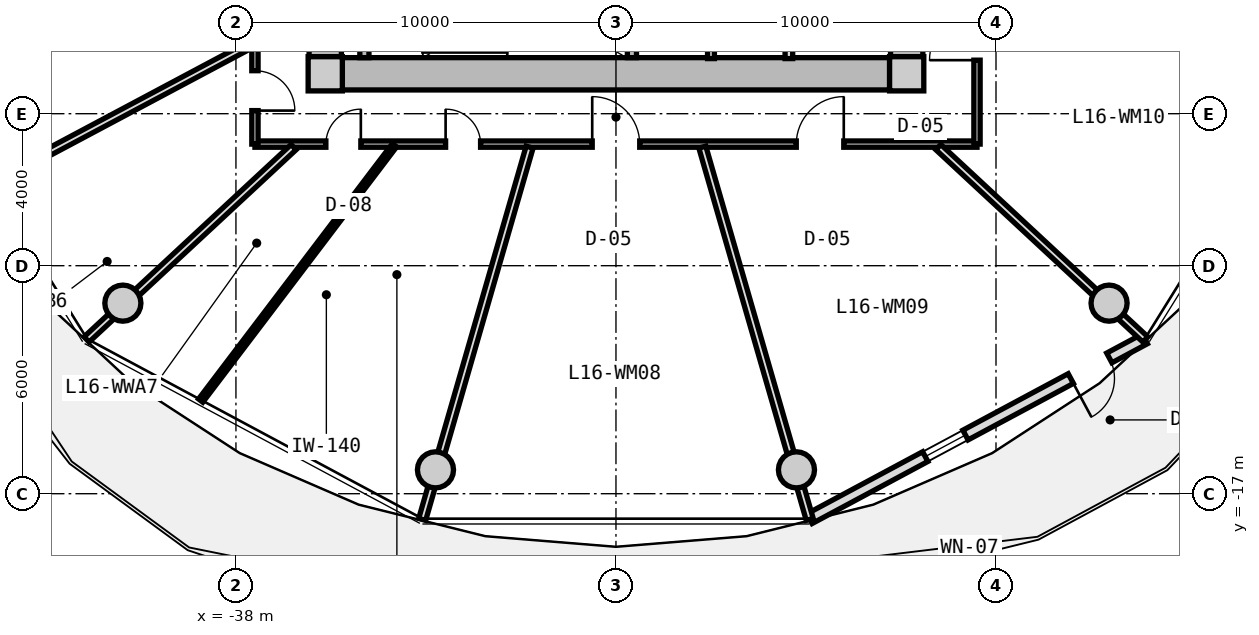
"""IFC4 building model, lengths in metres.
Left out: names, types, materials, properties, quantities, classifications, styles, units other than length and angle.
Written with IfcOpenShell. Run it as: python <this file> out.ifc"""

import sys

from ifc_helpers import new_model, si_unit, direction, frame, frame_2d, origin, origin_2d, place, context, subcontext, project, spatial, rectangle, circle, extrude, source, transform, mapped, element, fill, save


model = new_model("IFC4")
c1 = context("Model", 3, precision=1e-05, world=origin(), true_north=direction((0.0, 1.0)))
c2 = subcontext(c1, "Body", "Model", "MODEL_VIEW")
j1 = project(units=[si_unit("LENGTHUNIT", "METRE"), si_unit("PLANEANGLEUNIT", "RADIAN")], contexts=[c1])
p1 = place(None, origin())
s1 = spatial("IfcSite", under=j1, at=p1, CompositionType="ELEMENT")
p2 = place(p1, origin())
s2 = spatial("IfcBuilding", under=s1, at=p2, CompositionType="ELEMENT")
p3 = place(p2, frame((0.0, 0.0, 55.15)))
s3 = spatial("IfcBuildingStorey", under=s2, at=p3, CompositionType="ELEMENT", Elevation=55.15)
m1 = source(origin(), c2, "Body", "SweptSolid", [
    extrude(rectangle(XDim=0.9, YDim=0.9, at=origin_2d()), origin(), (0.0, 0.0, 1.0), 3.05),
])
for number, where, z_axis, x_axis in (
    (1, (-35.65, -5.95, 0.0), (0.0, 0.0, 1.0), (1.0, 0.0, 0.0)),
    (2, (-20.35, -5.95, 0.0), (0.0, 0.0, 1.0), (1.0, 0.0, 0.0)),
):
    element("IfcColumn", number, at=place(p3, frame(where, z_axis=z_axis, x_axis=x_axis)), inside=s3, PredefinedType="COLUMN", context=c2, shape_type="MappedRepresentation", body=[
        mapped(m1, transform((0.0, 0.0, 0.0), x_axis=(1.0, 0.0, 0.0), y_axis=(0.0, 1.0, 0.0), z_axis=(0.0, 0.0, 1.0), scale=1.0)),
    ])
m2 = source(origin(), c2, "Body", "SweptSolid", [
    extrude(rectangle(XDim=14.4, YDim=0.85, at=frame_2d((7.2, 0.0))), origin(), (0.0, 0.0, 1.0), 2.79),
])
p4 = place(p3, frame((-20.8, -5.95, 0.0), z_axis=(0.0, 0.0, 1.0), x_axis=(-1.0, 0.0, 0.0)))
e3 = element("IfcWall", 3, at=p4, inside=s3, PredefinedType="SHEAR", context=c2, shape_type="MappedRepresentation", body=[
    mapped(m2, transform((0.0, 0.0, 0.0), x_axis=(1.0, 0.0, 0.0), y_axis=(0.0, 1.0, 0.0), z_axis=(0.0, 0.0, 1.0), scale=1.0)),
])
m3 = source(origin(), c2, "Body", "SweptSolid", [
    extrude(rectangle(XDim=11.0, YDim=0.85, at=frame_2d((5.5, 0.0))), origin(), (0.0, 0.0, 1.0), 2.79),
])
p5 = place(p3, frame((-35.65, -5.5, 0.0), z_axis=(0.0, 0.0, 1.0), x_axis=(0.0, 1.0, 0.0)))
e4 = element("IfcWall", 4, at=p5, inside=s3, PredefinedType="SHEAR", context=c2, shape_type="MappedRepresentation", body=[
    mapped(m3, transform((0.0, 0.0, 0.0), x_axis=(1.0, 0.0, 0.0), y_axis=(0.0, 1.0, 0.0), z_axis=(0.0, 0.0, 1.0), scale=1.0)),
])
p6 = place(p5, frame((3.8, 0.0, 0.0)))
e5 = element("IfcOpeningElement", 5, at=p6, cuts=e4, PredefinedType="OPENING", context=c2, shape_type="SweptSolid", body=[
    extrude(rectangle(XDim=1.2, YDim=2.15, at=frame_2d((0.6, 1.075))), frame((0.0, 0.435, 0.0), z_axis=(0.0, -1.0, 0.0), x_axis=(1.0, 0.0, 0.0)), (0.0, 0.0, 1.0), 0.87),
])
p7 = place(p3, frame((-20.35, 5.5, 0.0), z_axis=(0.0, 0.0, 1.0), x_axis=(0.0, -1.0, 0.0)))
e6 = element("IfcWall", 6, at=p7, inside=s3, PredefinedType="SHEAR", context=c2, shape_type="MappedRepresentation", body=[
    mapped(m3, transform((0.0, 0.0, 0.0), x_axis=(1.0, 0.0, 0.0), y_axis=(0.0, 1.0, 0.0), z_axis=(0.0, 0.0, 1.0), scale=1.0)),
])
p8 = place(p7, frame((5.65, 0.0, 0.0)))
e7 = element("IfcOpeningElement", 7, at=p8, cuts=e6, PredefinedType="OPENING", context=c2, shape_type="SweptSolid", body=[
    extrude(rectangle(XDim=1.2, YDim=2.15, at=frame_2d((0.6, 1.075))), frame((0.0, 0.435, 0.0), z_axis=(0.0, -1.0, 0.0), x_axis=(1.0, 0.0, 0.0)), (0.0, 0.0, 1.0), 0.87),
])
p9 = place(p7, frame((9.3, 0.0, 0.0)))
e8 = element("IfcOpeningElement", 8, at=p9, cuts=e6, PredefinedType="OPENING", context=c2, shape_type="SweptSolid", body=[
    extrude(rectangle(XDim=1.0, YDim=2.1, at=frame_2d((0.5, 1.05))), frame((0.0, 0.435, 0.0), z_axis=(0.0, -1.0, 0.0), x_axis=(1.0, 0.0, 0.0)), (0.0, 0.0, 1.0), 0.87),
])
m4 = source(origin(), c2, "Body", "SweptSolid", [
    extrude(circle(Radius=0.475, at=origin_2d()), origin(), (0.0, 0.0, 1.0), 3.05),
])
for number, where, z_axis, x_axis in (
    (9, (-40.975, -11.985, 0.0), (0.0, 0.0, 1.0), (1.0, 0.0, 0.0)),
    (10, (-32.749, -16.373, 0.0), (0.0, 0.0, 1.0), (1.0, 0.0, 0.0)),
    (11, (-23.251, -16.373, 0.0), (0.0, 0.0, 1.0), (1.0, 0.0, 0.0)),
    (12, (-15.025, -11.985, 0.0), (0.0, 0.0, 1.0), (1.0, 0.0, 0.0)),
):
    element("IfcColumn", number, at=place(p3, frame(where, z_axis=z_axis, x_axis=x_axis)), inside=s3, PredefinedType="COLUMN", context=c2, shape_type="MappedRepresentation", body=[
        mapped(m4, transform((0.0, 0.0, 0.0), x_axis=(1.0, 0.0, 0.0), y_axis=(0.0, 1.0, 0.0), z_axis=(0.0, 0.0, 1.0), scale=1.0)),
    ])
m5 = source(origin(), c2, "Body", "SweptSolid", [
    extrude(rectangle(XDim=10.011, YDim=0.29, at=frame_2d((5.005, 0.0))), origin(), (0.0, 0.0, 1.0), 2.79),
])
p10 = place(p3, frame((-14.084, -12.926, 0.0), z_axis=(0.0, 0.0, 1.0), x_axis=(-0.881272505317, -0.472608475773, 0.0)))
e13 = element("IfcWall", 13, at=p10, inside=s3, PredefinedType="SOLIDWALL", context=c2, shape_type="MappedRepresentation", body=[
    mapped(m5, transform((0.0, 0.0, 0.0), x_axis=(1.0, 0.0, 0.0), y_axis=(0.0, 1.0, 0.0), z_axis=(0.0, 0.0, 1.0), scale=1.0)),
])
p11 = place(p10, frame((1.06, 0.0, 0.0)))
e14 = element("IfcOpeningElement", 14, at=p11, cuts=e13, PredefinedType="OPENING", context=c2, shape_type="SweptSolid", body=[
    extrude(rectangle(XDim=1.15, YDim=2.25, at=frame_2d((0.575, 1.125))), frame((0.0, 0.155, 0.0), z_axis=(0.0, -1.0, 0.0), x_axis=(1.0, 0.0, 0.0)), (0.0, 0.0, 1.0), 0.31),
])
p12 = place(p10, frame((5.355, 0.0, 0.85)))
e15 = element("IfcOpeningElement", 15, at=p12, cuts=e13, PredefinedType="OPENING", context=c2, shape_type="SweptSolid", body=[
    extrude(rectangle(XDim=1.2, YDim=1.5, at=frame_2d((0.6, 0.75))), frame((0.0, 0.155, 0.0), z_axis=(0.0, -1.0, 0.0), x_axis=(1.0, 0.0, 0.0)), (0.0, 0.0, 1.0), 0.31),
])
m6 = source(origin(), c2, "Body", "SweptSolid", [
    extrude(rectangle(XDim=3.075, YDim=0.24, at=frame_2d((1.538, 0.0))), origin(), (0.0, 0.0, 1.0), 2.79),
])
for number, where, z_axis, x_axis in (
    (16, (-34.62, -5.525, 0.0), (0.0, 0.0, 1.0), (0.0, 1.0, 0.0)),
    (17, (-27.58, -5.525, 0.0), (0.0, 0.0, 1.0), (0.0, 1.0, 0.0)),
):
    element("IfcWall", number, at=place(p3, frame(where, z_axis=z_axis, x_axis=x_axis)), inside=s3, PredefinedType="PARTITIONING", context=c2, shape_type="MappedRepresentation", body=[
        mapped(m6, transform((0.0, 0.0, 0.0), x_axis=(1.0, 0.0, 0.0), y_axis=(0.0, 1.0, 0.0), z_axis=(0.0, 0.0, 1.0), scale=1.0)),
    ])
m7 = source(origin(), c2, "Body", "SweptSolid", [
    extrude(rectangle(XDim=3.8, YDim=0.2, at=frame_2d((1.9, 0.0))), origin(), (0.0, 0.0, 1.0), 2.775),
])
p13 = place(p3, frame((-23.45, -5.55, 0.0), z_axis=(0.0, 0.0, 1.0), x_axis=(0.0, 1.0, 0.0)))
e18 = element("IfcWall", 18, at=p13, inside=s3, PredefinedType="PARTITIONING", context=c2, shape_type="MappedRepresentation", body=[
    mapped(m7, transform((0.0, 0.0, 0.0), x_axis=(1.0, 0.0, 0.0), y_axis=(0.0, 1.0, 0.0), z_axis=(0.0, 0.0, 1.0), scale=1.0)),
])
m8 = source(origin(), c2, "Body", "SweptSolid", [
    extrude(rectangle(XDim=3.22, YDim=0.18, at=frame_2d((1.61, 0.0))), origin(), (0.0, 0.0, 1.0), 2.775),
])
p14 = place(p3, frame((-25.5, -5.55, 0.0), z_axis=(0.0, 0.0, 1.0), x_axis=(0.0, 1.0, 0.0)))
e19 = element("IfcWall", 19, at=p14, inside=s3, PredefinedType="PARTITIONING", context=c2, shape_type="MappedRepresentation", body=[
    mapped(m8, transform((0.0, 0.0, 0.0), x_axis=(1.0, 0.0, 0.0), y_axis=(0.0, 1.0, 0.0), z_axis=(0.0, 0.0, 1.0), scale=1.0)),
])
m9 = source(origin(), c2, "Body", "SweptSolid", [
    extrude(rectangle(XDim=19.0, YDim=0.165, at=frame_2d((9.5, 0.0))), origin(), (0.0, 0.0, 1.0), 2.775),
])
p15 = place(p3, frame((-18.5, -7.8, 0.0), z_axis=(0.0, 0.0, 1.0), x_axis=(-1.0, 0.0, 0.0)))
e20 = element("IfcWall", 20, at=p15, inside=s3, PredefinedType="PARTITIONING", context=c2, shape_type="MappedRepresentation", body=[
    mapped(m9, transform((0.0, 0.0, 0.0), x_axis=(1.0, 0.0, 0.0), y_axis=(0.0, 1.0, 0.0), z_axis=(0.0, 0.0, 1.0), scale=1.0)),
])
p16 = place(p15, frame((16.214, 0.0, 0.0)))
e21 = element("IfcOpeningElement", 21, at=p16, cuts=e20, PredefinedType="OPENING", context=c2, shape_type="SweptSolid", body=[
    extrude(rectangle(XDim=0.92, YDim=2.1, at=frame_2d((0.46, 1.05))), frame((0.0, 0.093, 0.0), z_axis=(0.0, -1.0, 0.0), x_axis=(1.0, 0.0, 0.0)), (0.0, 0.0, 1.0), 0.185),
])
p17 = place(p15, frame((13.063, 0.0, 0.0)))
e22 = element("IfcOpeningElement", 22, at=p17, cuts=e20, PredefinedType="OPENING", context=c2, shape_type="SweptSolid", body=[
    extrude(rectangle(XDim=0.92, YDim=2.1, at=frame_2d((0.46, 1.05))), frame((0.0, 0.093, 0.0), z_axis=(0.0, -1.0, 0.0), x_axis=(1.0, 0.0, 0.0)), (0.0, 0.0, 1.0), 0.185),
])
p18 = place(p15, frame((8.875, 0.0, 0.0)))
e23 = element("IfcOpeningElement", 23, at=p18, cuts=e20, PredefinedType="OPENING", context=c2, shape_type="SweptSolid", body=[
    extrude(rectangle(XDim=1.25, YDim=2.2, at=frame_2d((0.625, 1.1))), frame((0.0, 0.093, 0.0), z_axis=(0.0, -1.0, 0.0), x_axis=(1.0, 0.0, 0.0)), (0.0, 0.0, 1.0), 0.185),
])
p19 = place(p15, frame((3.506, 0.0, 0.0)))
e24 = element("IfcOpeningElement", 24, at=p19, cuts=e20, PredefinedType="OPENING", context=c2, shape_type="SweptSolid", body=[
    extrude(rectangle(XDim=1.25, YDim=2.2, at=frame_2d((0.625, 1.1))), frame((0.0, 0.093, 0.0), z_axis=(0.0, -1.0, 0.0), x_axis=(1.0, 0.0, 0.0)), (0.0, 0.0, 1.0), 0.185),
])
m10 = source(origin(), c2, "Body", "SweptSolid", [
    extrude(rectangle(XDim=15.6, YDim=0.165, at=frame_2d((7.8, 0.0))), origin(), (0.0, 0.0, 1.0), 2.775),
])
p20 = place(p3, frame((-37.5, -7.8, 0.0), z_axis=(0.0, 0.0, 1.0), x_axis=(0.0, 1.0, 0.0)))
e25 = element("IfcWall", 25, at=p20, inside=s3, PredefinedType="PARTITIONING", context=c2, shape_type="MappedRepresentation", body=[
    mapped(m10, transform((0.0, 0.0, 0.0), x_axis=(1.0, 0.0, 0.0), y_axis=(0.0, 1.0, 0.0), z_axis=(0.0, 0.0, 1.0), scale=1.0)),
])
p21 = place(p20, frame((13.623, 0.0, 0.0)))
e26 = element("IfcOpeningElement", 26, at=p21, cuts=e25, PredefinedType="OPENING", context=c2, shape_type="SweptSolid", body=[
    extrude(rectangle(XDim=1.05, YDim=2.15, at=frame_2d((0.525, 1.075))), frame((0.0, 0.093, 0.0), z_axis=(0.0, -1.0, 0.0), x_axis=(1.0, 0.0, 0.0)), (0.0, 0.0, 1.0), 0.185),
])
p22 = place(p20, frame((11.018, 0.0, 0.0)))
e27 = element("IfcOpeningElement", 27, at=p22, cuts=e25, PredefinedType="OPENING", context=c2, shape_type="SweptSolid", body=[
    extrude(rectangle(XDim=1.05, YDim=2.15, at=frame_2d((0.525, 1.075))), frame((0.0, 0.093, 0.0), z_axis=(0.0, -1.0, 0.0), x_axis=(1.0, 0.0, 0.0)), (0.0, 0.0, 1.0), 0.185),
])
p23 = place(p20, frame((8.467, 0.0, 0.0)))
e28 = element("IfcOpeningElement", 28, at=p23, cuts=e25, PredefinedType="OPENING", context=c2, shape_type="SweptSolid", body=[
    extrude(rectangle(XDim=1.05, YDim=2.15, at=frame_2d((0.525, 1.075))), frame((0.0, 0.093, 0.0), z_axis=(0.0, -1.0, 0.0), x_axis=(1.0, 0.0, 0.0)), (0.0, 0.0, 1.0), 0.185),
])
p24 = place(p20, frame((6.035, 0.0, 0.0)))
e29 = element("IfcOpeningElement", 29, at=p24, cuts=e25, PredefinedType="OPENING", context=c2, shape_type="SweptSolid", body=[
    extrude(rectangle(XDim=1.05, YDim=2.15, at=frame_2d((0.525, 1.075))), frame((0.0, 0.093, 0.0), z_axis=(0.0, -1.0, 0.0), x_axis=(1.0, 0.0, 0.0)), (0.0, 0.0, 1.0), 0.185),
])
p25 = place(p20, frame((3.489, 0.0, 0.0)))
e30 = element("IfcOpeningElement", 30, at=p25, cuts=e25, PredefinedType="OPENING", context=c2, shape_type="SweptSolid", body=[
    extrude(rectangle(XDim=1.05, YDim=2.15, at=frame_2d((0.525, 1.075))), frame((0.0, 0.093, 0.0), z_axis=(0.0, -1.0, 0.0), x_axis=(1.0, 0.0, 0.0)), (0.0, 0.0, 1.0), 0.185),
])
p26 = place(p20, frame((0.882, 0.0, 0.0)))
e31 = element("IfcOpeningElement", 31, at=p26, cuts=e25, PredefinedType="OPENING", context=c2, shape_type="SweptSolid", body=[
    extrude(rectangle(XDim=1.05, YDim=2.15, at=frame_2d((0.525, 1.075))), frame((0.0, 0.093, 0.0), z_axis=(0.0, -1.0, 0.0), x_axis=(1.0, 0.0, 0.0)), (0.0, 0.0, 1.0), 0.185),
])
p27 = place(p3, frame((-18.5, 7.8, 0.0), z_axis=(0.0, 0.0, 1.0), x_axis=(0.0, -1.0, 0.0)))
e32 = element("IfcWall", 32, at=p27, inside=s3, PredefinedType="PARTITIONING", context=c2, shape_type="MappedRepresentation", body=[
    mapped(m10, transform((0.0, 0.0, 0.0), x_axis=(1.0, 0.0, 0.0), y_axis=(0.0, 1.0, 0.0), z_axis=(0.0, 0.0, 1.0), scale=1.0)),
])
p28 = place(p27, frame((12.141, 0.0, 0.0)))
e33 = element("IfcOpeningElement", 33, at=p28, cuts=e32, PredefinedType="OPENING", context=c2, shape_type="SweptSolid", body=[
    extrude(rectangle(XDim=1.25, YDim=2.2, at=frame_2d((0.625, 1.1))), frame((0.0, 0.093, 0.0), z_axis=(0.0, -1.0, 0.0), x_axis=(1.0, 0.0, 0.0)), (0.0, 0.0, 1.0), 0.185),
])
p29 = place(p27, frame((7.175, 0.0, 0.0)))
e34 = element("IfcOpeningElement", 34, at=p29, cuts=e32, PredefinedType="OPENING", context=c2, shape_type="SweptSolid", body=[
    extrude(rectangle(XDim=1.25, YDim=2.2, at=frame_2d((0.625, 1.1))), frame((0.0, 0.093, 0.0), z_axis=(0.0, -1.0, 0.0), x_axis=(1.0, 0.0, 0.0)), (0.0, 0.0, 1.0), 0.185),
])
p30 = place(p27, frame((2.826, 0.0, 0.0)))
e35 = element("IfcOpeningElement", 35, at=p30, cuts=e32, PredefinedType="OPENING", context=c2, shape_type="SweptSolid", body=[
    extrude(rectangle(XDim=1.05, YDim=2.15, at=frame_2d((0.525, 1.075))), frame((0.0, 0.093, 0.0), z_axis=(0.0, -1.0, 0.0), x_axis=(1.0, 0.0, 0.0)), (0.0, 0.0, 1.0), 0.185),
])
p31 = place(p27, frame((0.881, 0.0, 0.0)))
e36 = element("IfcOpeningElement", 36, at=p31, cuts=e32, PredefinedType="OPENING", context=c2, shape_type="SweptSolid", body=[
    extrude(rectangle(XDim=1.05, YDim=2.15, at=frame_2d((0.525, 1.075))), frame((0.0, 0.093, 0.0), z_axis=(0.0, -1.0, 0.0), x_axis=(1.0, 0.0, 0.0)), (0.0, 0.0, 1.0), 0.185),
])
m11 = source(origin(), c2, "Body", "SweptSolid", [
    extrude(rectangle(XDim=7.435, YDim=0.19, at=frame_2d((3.717, 0.0))), origin(), (0.0, 0.0, 1.0), 2.225),
])
p32 = place(p3, frame((-36.483, -7.88, 0.0), z_axis=(0.0, 0.0, 1.0), x_axis=(-0.732651956848, -0.680603489652, 0.0)))
e37 = element("IfcWall", 37, at=p32, inside=s3, PredefinedType="PARTITIONING", context=c2, shape_type="MappedRepresentation", body=[
    mapped(m11, transform((0.0, 0.0, 0.0), x_axis=(1.0, 0.0, 0.0), y_axis=(0.0, 1.0, 0.0), z_axis=(0.0, 0.0, 1.0), scale=1.0)),
])
m12 = source(origin(), c2, "Body", "SweptSolid", [
    extrude(rectangle(XDim=7.873, YDim=0.19, at=frame_2d((3.937, 0.0))), origin(), (0.0, 0.0, 1.0), 2.775),
])
p33 = place(p3, frame((-37.53, -5.138, 0.0), z_axis=(0.0, 0.0, 1.0), x_axis=(-0.882666052726, -0.470000680175, 0.0)))
e38 = element("IfcWall", 38, at=p33, inside=s3, PredefinedType="PARTITIONING", context=c2, shape_type="MappedRepresentation", body=[
    mapped(m12, transform((0.0, 0.0, 0.0), x_axis=(1.0, 0.0, 0.0), y_axis=(0.0, 1.0, 0.0), z_axis=(0.0, 0.0, 1.0), scale=1.0)),
])
m13 = source(origin(), c2, "Body", "SweptSolid", [
    extrude(rectangle(XDim=10.196, YDim=0.19, at=frame_2d((5.098, 0.0))), origin(), (0.0, 0.0, 1.0), 2.225),
])
p34 = place(p3, frame((-30.273, -7.88, 0.0), z_axis=(0.0, 0.0, 1.0), x_axis=(-0.277136420347, -0.960830580549, 0.0)))
e39 = element("IfcWall", 39, at=p34, inside=s3, PredefinedType="PARTITIONING", context=c2, shape_type="MappedRepresentation", body=[
    mapped(m13, transform((0.0, 0.0, 0.0), x_axis=(1.0, 0.0, 0.0), y_axis=(0.0, 1.0, 0.0), z_axis=(0.0, 0.0, 1.0), scale=1.0)),
])
m14 = source(origin(), c2, "Body", "SweptSolid", [
    extrude(rectangle(XDim=8.436, YDim=0.14, at=frame_2d((4.218, 0.0))), origin(), (0.0, 0.0, 1.0), 2.775),
])
p35 = place(p3, frame((-33.828, -7.83, 0.0), z_axis=(0.0, 0.0, 1.0), x_axis=(-0.604486552388, -0.796615345058, 0.0)))
e40 = element("IfcWall", 40, at=p35, inside=s3, PredefinedType="PARTITIONING", context=c2, shape_type="MappedRepresentation", body=[
    mapped(m14, transform((0.0, 0.0, 0.0), x_axis=(1.0, 0.0, 0.0), y_axis=(0.0, 1.0, 0.0), z_axis=(0.0, 0.0, 1.0), scale=1.0)),
])
m15 = source(origin(), c2, "Body", "SweptSolid", [
    extrude(rectangle(XDim=10.196, YDim=0.19, at=frame_2d((5.098, 0.0))), origin(), (0.0, 0.0, 1.0), 2.415),
])
p36 = place(p3, frame((-25.727, -7.88, 0.0), z_axis=(0.0, 0.0, 1.0), x_axis=(0.277136420347, -0.960830580549, 0.0)))
e41 = element("IfcWall", 41, at=p36, inside=s3, PredefinedType="PARTITIONING", context=c2, shape_type="MappedRepresentation", body=[
    mapped(m15, transform((0.0, 0.0, 0.0), x_axis=(1.0, 0.0, 0.0), y_axis=(0.0, 1.0, 0.0), z_axis=(0.0, 0.0, 1.0), scale=1.0)),
])
p37 = place(p3, frame((-19.517, -7.88, 0.0), z_axis=(0.0, 0.0, 1.0), x_axis=(0.732651956848, -0.680603489652, 0.0)))
e42 = element("IfcWall", 42, at=p37, inside=s3, PredefinedType="PARTITIONING", context=c2, shape_type="MappedRepresentation", body=[
    mapped(m11, transform((0.0, 0.0, 0.0), x_axis=(1.0, 0.0, 0.0), y_axis=(0.0, 1.0, 0.0), z_axis=(0.0, 0.0, 1.0), scale=1.0)),
])
m16 = source(origin(), c2, "Body", "SweptSolid", [
    extrude(rectangle(XDim=1.15, YDim=2.25, at=frame_2d((0.575, 1.125))), frame((0.0, 0.025, 0.0), z_axis=(0.0, -1.0, 0.0), x_axis=(1.0, 0.0, 0.0)), (0.0, 0.0, 1.0), 0.05),
])
p38 = place(p11, origin())
e43 = element("IfcDoor", 43, at=p38, inside=s3, OperationType="SINGLE_SWING_RIGHT", PredefinedType="DOOR", context=c2, shape_type="MappedRepresentation", body=[
    mapped(m16, transform((0.0, 0.0, 0.0), x_axis=(1.0, 0.0, 0.0), y_axis=(0.0, 1.0, 0.0), z_axis=(0.0, 0.0, 1.0), scale=1.0)),
])
fill(e14, e43)
m17 = source(origin(), c2, "Body", "SweptSolid", [
    extrude(rectangle(XDim=1.2, YDim=1.5, at=frame_2d((0.6, 0.75))), frame((0.0, 0.03, 0.0), z_axis=(0.0, -1.0, 0.0), x_axis=(1.0, 0.0, 0.0)), (0.0, 0.0, 1.0), 0.06),
])
p39 = place(p12, origin())
e44 = element("IfcWindow", 44, at=p39, inside=s3, PartitioningType="SINGLE_PANEL", PredefinedType="WINDOW", context=c2, shape_type="MappedRepresentation", body=[
    mapped(m17, transform((0.0, 0.0, 0.0), x_axis=(1.0, 0.0, 0.0), y_axis=(0.0, 1.0, 0.0), z_axis=(0.0, 0.0, 1.0), scale=1.0)),
])
fill(e15, e44)
m18 = source(origin(), c2, "Body", "SweptSolid", [
    extrude(rectangle(XDim=1.05, YDim=2.15, at=frame_2d((0.525, 1.075))), frame((0.0, 0.025, 0.0), z_axis=(0.0, -1.0, 0.0), x_axis=(1.0, 0.0, 0.0)), (0.0, 0.0, 1.0), 0.05),
])
p40 = place(p26, frame((1.05, 0.0, 0.0), z_axis=(0.0, 0.0, 1.0), x_axis=(-1.0, 0.0, 0.0)))
e45 = element("IfcDoor", 45, at=p40, inside=s3, OperationType="SINGLE_SWING_RIGHT", PredefinedType="DOOR", context=c2, shape_type="MappedRepresentation", body=[
    mapped(m18, transform((0.0, 0.0, 0.0), x_axis=(1.0, 0.0, 0.0), y_axis=(0.0, 1.0, 0.0), z_axis=(0.0, 0.0, 1.0), scale=1.0)),
])
fill(e31, e45)
m19 = source(origin(), c2, "Body", "SweptSolid", [
    extrude(rectangle(XDim=0.92, YDim=2.1, at=frame_2d((0.46, 1.05))), frame((0.0, 0.025, 0.0), z_axis=(0.0, -1.0, 0.0), x_axis=(1.0, 0.0, 0.0)), (0.0, 0.0, 1.0), 0.05),
])
p41 = place(p16, frame((0.92, 0.0, 0.0), z_axis=(0.0, 0.0, 1.0), x_axis=(-1.0, 0.0, 0.0)))
e46 = element("IfcDoor", 46, at=p41, inside=s3, OperationType="SINGLE_SWING_RIGHT", PredefinedType="DOOR", context=c2, shape_type="MappedRepresentation", body=[
    mapped(m19, transform((0.0, 0.0, 0.0), x_axis=(1.0, 0.0, 0.0), y_axis=(0.0, 1.0, 0.0), z_axis=(0.0, 0.0, 1.0), scale=1.0)),
])
fill(e21, e46)
p42 = place(p17, frame((0.92, 0.0, 0.0), z_axis=(0.0, 0.0, 1.0), x_axis=(-1.0, 0.0, 0.0)))
e47 = element("IfcDoor", 47, at=p42, inside=s3, OperationType="SINGLE_SWING_LEFT", PredefinedType="DOOR", context=c2, shape_type="MappedRepresentation", body=[
    mapped(m19, transform((0.0, 0.0, 0.0), x_axis=(1.0, 0.0, 0.0), y_axis=(0.0, 1.0, 0.0), z_axis=(0.0, 0.0, 1.0), scale=1.0)),
])
fill(e22, e47)
m20 = source(origin(), c2, "Body", "SweptSolid", [
    extrude(rectangle(XDim=1.25, YDim=2.2, at=frame_2d((0.625, 1.1))), frame((0.0, 0.025, 0.0), z_axis=(0.0, -1.0, 0.0), x_axis=(1.0, 0.0, 0.0)), (0.0, 0.0, 1.0), 0.05),
])
p43 = place(p18, frame((1.25, 0.0, 0.0), z_axis=(0.0, 0.0, 1.0), x_axis=(-1.0, 0.0, 0.0)))
e48 = element("IfcDoor", 48, at=p43, inside=s3, OperationType="SINGLE_SWING_LEFT", PredefinedType="DOOR", context=c2, shape_type="MappedRepresentation", body=[
    mapped(m20, transform((0.0, 0.0, 0.0), x_axis=(1.0, 0.0, 0.0), y_axis=(0.0, 1.0, 0.0), z_axis=(0.0, 0.0, 1.0), scale=1.0)),
])
fill(e23, e48)
p44 = place(p19, frame((1.25, 0.0, 0.0), z_axis=(0.0, 0.0, 1.0), x_axis=(-1.0, 0.0, 0.0)))
e49 = element("IfcDoor", 49, at=p44, inside=s3, OperationType="SINGLE_SWING_RIGHT", PredefinedType="DOOR", context=c2, shape_type="MappedRepresentation", body=[
    mapped(m20, transform((0.0, 0.0, 0.0), x_axis=(1.0, 0.0, 0.0), y_axis=(0.0, 1.0, 0.0), z_axis=(0.0, 0.0, 1.0), scale=1.0)),
])
fill(e24, e49)
p45 = place(p28, frame((1.25, 0.0, 0.0), z_axis=(0.0, 0.0, 1.0), x_axis=(-1.0, 0.0, 0.0)))
e50 = element("IfcDoor", 50, at=p45, inside=s3, OperationType="SINGLE_SWING_LEFT", PredefinedType="DOOR", context=c2, shape_type="MappedRepresentation", body=[
    mapped(m20, transform((0.0, 0.0, 0.0), x_axis=(1.0, 0.0, 0.0), y_axis=(0.0, 1.0, 0.0), z_axis=(0.0, 0.0, 1.0), scale=1.0)),
])
fill(e33, e50)
save(model, sys.argv[1])
